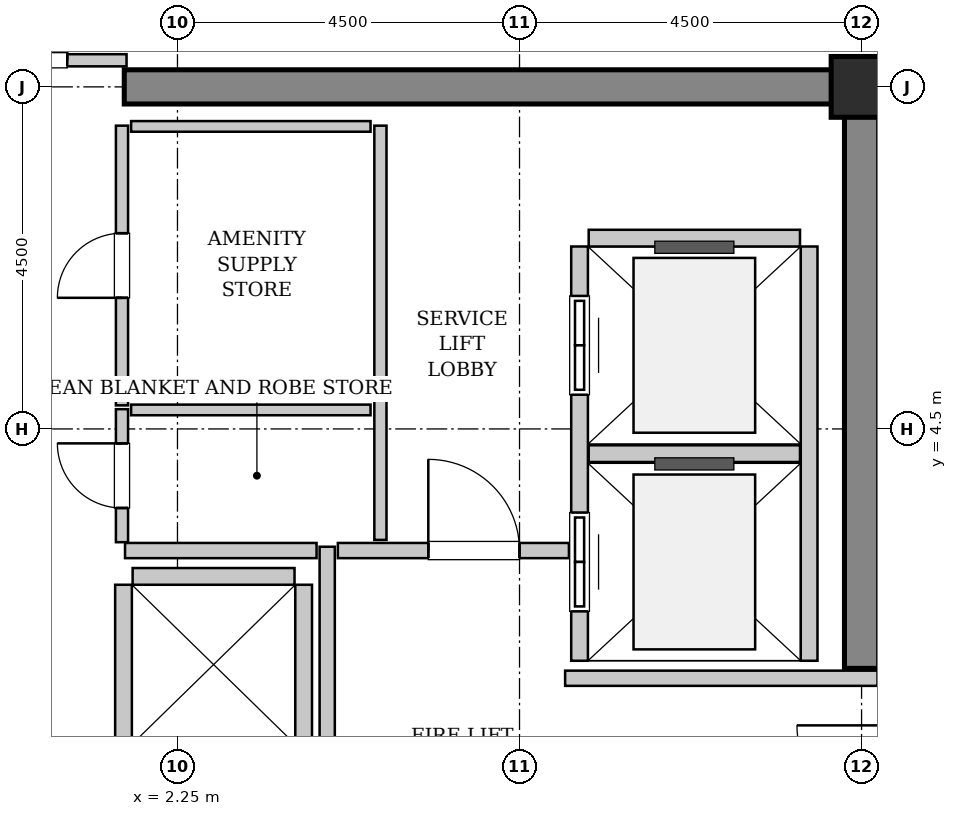
"""IFC4 building model, lengths in metres.
Left out: names, types, materials, properties, quantities, classifications, styles, units other than length and angle.
Written with IfcOpenShell. Run it as: python <this file> out.ifc"""

import sys

from ifc_helpers import new_model, si_unit, direction, frame, frame_2d, origin, origin_2d, place, context, subcontext, project, spatial, rectangle, hollow_rectangle, extrude, source, transform, mapped, element, fill, save


model = new_model("IFC4")
c1 = context("Model", 3, precision=1e-05, world=origin(), true_north=direction((0.0, 1.0)))
c2 = subcontext(c1, "Body", "Model", "MODEL_VIEW")
j1 = project(units=[si_unit("LENGTHUNIT", "METRE"), si_unit("PLANEANGLEUNIT", "RADIAN")], contexts=[c1])
p1 = place(None, origin())
s1 = spatial("IfcSite", under=j1, at=p1, CompositionType="ELEMENT")
p2 = place(p1, origin())
s2 = spatial("IfcBuilding", under=s1, at=p2, CompositionType="ELEMENT")
p3 = place(p2, frame((0.0, 0.0, 295.0)))
s3 = spatial("IfcBuildingStorey", under=s2, at=p3, CompositionType="ELEMENT", Elevation=295.0)
m1 = source(origin(), c2, "Body", "SweptSolid", [
    extrude(rectangle(XDim=9.925, YDim=0.45, at=frame_2d((4.962, 0.0))), origin(), (0.0, 0.0, 1.0), 3.8),
])
p4 = place(p3, frame((1.55, 9.0, 0.0), z_axis=(0.0, 0.0, 1.0), x_axis=(1.0, 0.0, 0.0)))
e1 = element("IfcWall", 1, at=p4, inside=s3, PredefinedType="SHEAR", context=c2, shape_type="MappedRepresentation", body=[
    mapped(m1, transform((0.0, 0.0, 0.0), x_axis=(1.0, 0.0, 0.0), y_axis=(0.0, 1.0, 0.0), z_axis=(0.0, 0.0, 1.0), scale=1.0)),
])
m2 = source(origin(), c2, "Body", "SweptSolid", [
    extrude(rectangle(XDim=7.425, YDim=0.45, at=frame_2d((3.712, 0.0))), origin(), (0.0, 0.0, 1.0), 3.8),
])
p5 = place(p3, frame((11.25, 1.35, 0.0), z_axis=(0.0, 0.0, 1.0), x_axis=(0.0, 1.0, 0.0)))
e2 = element("IfcWall", 2, at=p5, inside=s3, PredefinedType="SHEAR", context=c2, shape_type="MappedRepresentation", body=[
    mapped(m2, transform((0.0, 0.0, 0.0), x_axis=(1.0, 0.0, 0.0), y_axis=(0.0, 1.0, 0.0), z_axis=(0.0, 0.0, 1.0), scale=1.0)),
])
m3 = source(origin(), c2, "Body", "SweptSolid", [
    extrude(hollow_rectangle(XDim=0.8, YDim=0.8, WallThickness=0.04, InnerFilletRadius=0.04, OuterFilletRadius=0.08, at=origin_2d()), origin(), (0.0, 0.0, 1.0), 3.8),
])
p6 = place(p3, frame((11.25, 9.0, 0.0), z_axis=(0.0, 0.0, 1.0), x_axis=(1.0, 0.0, 0.0)))
e3 = element("IfcColumn", 3, at=p6, inside=s3, PredefinedType="COLUMN", context=c2, shape_type="MappedRepresentation", body=[
    mapped(m3, transform((0.0, 0.0, 0.0), x_axis=(1.0, 0.0, 0.0), y_axis=(0.0, 1.0, 0.0), z_axis=(0.0, 0.0, 1.0), scale=1.0)),
])
m4 = source(origin(), c2, "Body", "SweptSolid", [
    extrude(rectangle(XDim=5.45, YDim=0.22, at=frame_2d((2.725, 0.0))), origin(), (0.0, 0.0, 1.0), 3.535),
])
p7 = place(p3, frame((7.54, 6.9, 0.0), z_axis=(0.0, 0.0, 1.0), x_axis=(0.0, -1.0, 0.0)))
e4 = element("IfcWall", 4, at=p7, inside=s3, PredefinedType="SOLIDWALL", context=c2, shape_type="MappedRepresentation", body=[
    mapped(m4, transform((0.0, 0.0, 0.0), x_axis=(1.0, 0.0, 0.0), y_axis=(0.0, 1.0, 0.0), z_axis=(0.0, 0.0, 1.0), scale=1.0)),
])
p8 = place(p7, frame((3.5, 0.0, 0.0)))
e5 = element("IfcOpeningElement", 5, at=p8, cuts=e4, PredefinedType="OPENING", context=c2, shape_type="SweptSolid", body=[
    extrude(rectangle(XDim=1.3, YDim=2.3, at=frame_2d((0.65, 1.15))), frame((0.0, 0.12, 0.0), z_axis=(0.0, -1.0, 0.0), x_axis=(1.0, 0.0, 0.0)), (0.0, 0.0, 1.0), 0.24),
])
p9 = place(p7, frame((0.65, 0.0, 0.0)))
e6 = element("IfcOpeningElement", 6, at=p9, cuts=e4, PredefinedType="OPENING", context=c2, shape_type="SweptSolid", body=[
    extrude(rectangle(XDim=1.3, YDim=2.3, at=frame_2d((0.65, 1.15))), frame((0.0, 0.12, 0.0), z_axis=(0.0, -1.0, 0.0), x_axis=(1.0, 0.0, 0.0)), (0.0, 0.0, 1.0), 0.24),
])
p10 = place(p3, frame((10.56, 1.45, 0.0), z_axis=(0.0, 0.0, 1.0), x_axis=(0.0, 1.0, 0.0)))
e7 = element("IfcWall", 7, at=p10, inside=s3, PredefinedType="SOLIDWALL", context=c2, shape_type="MappedRepresentation", body=[
    mapped(m4, transform((0.0, 0.0, 0.0), x_axis=(1.0, 0.0, 0.0), y_axis=(0.0, 1.0, 0.0), z_axis=(0.0, 0.0, 1.0), scale=1.0)),
])
m5 = source(origin(), c2, "Body", "SweptSolid", [
    extrude(rectangle(XDim=2.78, YDim=0.22, at=frame_2d((1.39, 0.0))), origin(), (0.0, 0.0, 1.0), 3.535),
])
for number, where, z_axis, x_axis in (
    (8, (7.66, 4.175, 0.0), (0.0, 0.0, 1.0), (1.0, 0.0, 0.0)),
    (9, (10.44, 7.01, 0.0), (0.0, 0.0, 1.0), (-1.0, 0.0, 0.0)),
):
    element("IfcWall", number, at=place(p3, frame(where, z_axis=z_axis, x_axis=x_axis)), inside=s3, PredefinedType="SOLIDWALL", context=c2, shape_type="MappedRepresentation", body=[
        mapped(m5, transform((0.0, 0.0, 0.0), x_axis=(1.0, 0.0, 0.0), y_axis=(0.0, 1.0, 0.0), z_axis=(0.0, 0.0, 1.0), scale=1.0)),
    ])
m6 = source(origin(), c2, "Body", "SweptSolid", [
    extrude(rectangle(XDim=4.9, YDim=0.22, at=frame_2d((2.45, 0.0))), origin(), (0.0, 0.0, 1.0), 3.535),
])
for number, where, z_axis, x_axis in (
    (10, (1.54, 2.45, 0.0), (0.0, 0.0, 1.0), (0.0, -1.0, 0.0)),
    (11, (3.91, -2.45, 0.0), (0.0, 0.0, 1.0), (0.0, 1.0, 0.0)),
):
    element("IfcWall", number, at=place(p3, frame(where, z_axis=z_axis, x_axis=x_axis)), inside=s3, PredefinedType="SOLIDWALL", context=c2, shape_type="MappedRepresentation", body=[
        mapped(m6, transform((0.0, 0.0, 0.0), x_axis=(1.0, 0.0, 0.0), y_axis=(0.0, 1.0, 0.0), z_axis=(0.0, 0.0, 1.0), scale=1.0)),
    ])
m7 = source(origin(), c2, "Body", "SweptSolid", [
    extrude(rectangle(XDim=2.13, YDim=0.22, at=frame_2d((1.065, 0.0))), origin(), (0.0, 0.0, 1.0), 3.535),
])
p11 = place(p3, frame((3.79, 2.56, 0.0), z_axis=(0.0, 0.0, 1.0), x_axis=(-1.0, 0.0, 0.0)))
e12 = element("IfcWall", 12, at=p11, inside=s3, PredefinedType="SOLIDWALL", context=c2, shape_type="MappedRepresentation", body=[
    mapped(m7, transform((0.0, 0.0, 0.0), x_axis=(1.0, 0.0, 0.0), y_axis=(0.0, 1.0, 0.0), z_axis=(0.0, 0.0, 1.0), scale=1.0)),
])
m8 = source(origin(), c2, "Body", "SweptSolid", [
    extrude(rectangle(XDim=5.9, YDim=0.2, at=frame_2d((2.95, 0.0))), origin(), (0.0, 0.0, 1.0), 3.535),
])
p12 = place(p3, frame((4.22, -2.95, 0.0), z_axis=(0.0, 0.0, 1.0), x_axis=(0.0, 1.0, 0.0)))
e13 = element("IfcWall", 13, at=p12, inside=s3, PredefinedType="PARTITIONING", context=c2, shape_type="MappedRepresentation", body=[
    mapped(m8, transform((0.0, 0.0, 0.0), x_axis=(1.0, 0.0, 0.0), y_axis=(0.0, 1.0, 0.0), z_axis=(0.0, 0.0, 1.0), scale=1.0)),
])
m9 = source(origin(), c2, "Body", "SweptSolid", [
    extrude(rectangle(XDim=2.52, YDim=0.2, at=frame_2d((1.26, 0.0))), origin(), (0.0, 0.0, 1.0), 3.535),
])
p13 = place(p3, frame((1.56, 2.9, 0.0), z_axis=(0.0, 0.0, 1.0), x_axis=(1.0, 0.0, 0.0)))
e14 = element("IfcWall", 14, at=p13, inside=s3, PredefinedType="PARTITIONING", context=c2, shape_type="MappedRepresentation", body=[
    mapped(m9, transform((0.0, 0.0, 0.0), x_axis=(1.0, 0.0, 0.0), y_axis=(0.0, 1.0, 0.0), z_axis=(0.0, 0.0, 1.0), scale=1.0)),
])
m10 = source(origin(), c2, "Body", "SweptSolid", [
    extrude(rectangle(XDim=3.04, YDim=0.2, at=frame_2d((1.52, 0.0))), origin(), (0.0, 0.0, 1.0), 3.535),
])
p14 = place(p3, frame((4.36, 2.9, 0.0), z_axis=(0.0, 0.0, 1.0), x_axis=(1.0, 0.0, 0.0)))
e15 = element("IfcWall", 15, at=p14, inside=s3, PredefinedType="PARTITIONING", context=c2, shape_type="MappedRepresentation", body=[
    mapped(m10, transform((0.0, 0.0, 0.0), x_axis=(1.0, 0.0, 0.0), y_axis=(0.0, 1.0, 0.0), z_axis=(0.0, 0.0, 1.0), scale=1.0)),
])
p15 = place(p14, frame((1.19, 0.0, 0.0)))
e16 = element("IfcOpeningElement", 16, at=p15, cuts=e15, PredefinedType="OPENING", context=c2, shape_type="SweptSolid", body=[
    extrude(rectangle(XDim=1.2, YDim=2.15, at=frame_2d((0.6, 1.075))), frame((0.0, 0.11, 0.0), z_axis=(0.0, -1.0, 0.0), x_axis=(1.0, 0.0, 0.0)), (0.0, 0.0, 1.0), 0.22),
])
m11 = source(origin(), c2, "Body", "SweptSolid", [
    extrude(rectangle(XDim=4.11, YDim=0.2, at=frame_2d((2.055, 0.0))), origin(), (0.0, 0.0, 1.0), 3.535),
])
p16 = place(p3, frame((7.35, 1.22, 0.0), z_axis=(0.0, 0.0, 1.0), x_axis=(1.0, 0.0, 0.0)))
e17 = element("IfcWall", 17, at=p16, inside=s3, PredefinedType="PARTITIONING", context=c2, shape_type="MappedRepresentation", body=[
    mapped(m11, transform((0.0, 0.0, 0.0), x_axis=(1.0, 0.0, 0.0), y_axis=(0.0, 1.0, 0.0), z_axis=(0.0, 0.0, 1.0), scale=1.0)),
])
m12 = source(origin(), c2, "Body", "SweptSolid", [
    extrude(rectangle(XDim=3.16, YDim=0.16, at=frame_2d((1.58, 0.0))), origin(), (0.0, 0.0, 1.0), 2.625),
])
p17 = place(p3, frame((-1.58, 9.35, 0.0), z_axis=(0.0, 0.0, 1.0), x_axis=(1.0, 0.0, 0.0)))
e18 = element("IfcWall", 18, at=p17, inside=s3, PredefinedType="PARTITIONING", context=c2, shape_type="MappedRepresentation", body=[
    mapped(m12, transform((0.0, 0.0, 0.0), x_axis=(1.0, 0.0, 0.0), y_axis=(0.0, 1.0, 0.0), z_axis=(0.0, 0.0, 1.0), scale=1.0)),
])
p18 = place(p17, frame((0.78, 0.0, 0.0)))
e19 = element("IfcOpeningElement", 19, at=p18, cuts=e18, PredefinedType="OPENING", context=c2, shape_type="SweptSolid", body=[
    extrude(rectangle(XDim=1.6, YDim=2.3, at=frame_2d((0.8, 1.15))), frame((0.0, 0.09, 0.0), z_axis=(0.0, -1.0, 0.0), x_axis=(1.0, 0.0, 0.0)), (0.0, 0.0, 1.0), 0.18),
])
m13 = source(origin(), c2, "Body", "SweptSolid", [
    extrude(rectangle(XDim=5.45, YDim=0.16, at=frame_2d((2.725, 0.0))), origin(), (0.0, 0.0, 1.0), 3.535),
])
p19 = place(p3, frame((4.92, 3.04, 0.0), z_axis=(0.0, 0.0, 1.0), x_axis=(0.0, 1.0, 0.0)))
e20 = element("IfcWall", 20, at=p19, inside=s3, PredefinedType="PARTITIONING", context=c2, shape_type="MappedRepresentation", body=[
    mapped(m13, transform((0.0, 0.0, 0.0), x_axis=(1.0, 0.0, 0.0), y_axis=(0.0, 1.0, 0.0), z_axis=(0.0, 0.0, 1.0), scale=1.0)),
])
m14 = source(origin(), c2, "Body", "SweptSolid", [
    extrude(rectangle(XDim=1.75, YDim=0.16, at=frame_2d((0.875, 0.0))), origin(), (0.0, 0.0, 1.0), 3.535),
])
p20 = place(p3, frame((1.52, 3.01, 0.0), z_axis=(0.0, 0.0, 1.0), x_axis=(0.0, 1.0, 0.0)))
e21 = element("IfcWall", 21, at=p20, inside=s3, PredefinedType="PARTITIONING", context=c2, shape_type="MappedRepresentation", body=[
    mapped(m14, transform((0.0, 0.0, 0.0), x_axis=(1.0, 0.0, 0.0), y_axis=(0.0, 1.0, 0.0), z_axis=(0.0, 0.0, 1.0), scale=1.0)),
])
p21 = place(p20, frame((0.45, 0.0, 0.0)))
e22 = element("IfcOpeningElement", 22, at=p21, cuts=e21, PredefinedType="OPENING", context=c2, shape_type="SweptSolid", body=[
    extrude(rectangle(XDim=0.85, YDim=2.1, at=frame_2d((0.425, 1.05))), frame((0.0, 0.09, 0.0), z_axis=(0.0, -1.0, 0.0), x_axis=(1.0, 0.0, 0.0)), (0.0, 0.0, 1.0), 0.18),
])
m15 = source(origin(), c2, "Body", "SweptSolid", [
    extrude(rectangle(XDim=3.15, YDim=0.14, at=frame_2d((1.575, 0.0))), origin(), (0.0, 0.0, 1.0), 3.535),
])
p22 = place(p3, frame((1.64, 4.75, 0.0), z_axis=(0.0, 0.0, 1.0), x_axis=(1.0, 0.0, 0.0)))
e23 = element("IfcWall", 23, at=p22, inside=s3, PredefinedType="PARTITIONING", context=c2, shape_type="MappedRepresentation", body=[
    mapped(m15, transform((0.0, 0.0, 0.0), x_axis=(1.0, 0.0, 0.0), y_axis=(0.0, 1.0, 0.0), z_axis=(0.0, 0.0, 1.0), scale=1.0)),
])
m16 = source(origin(), c2, "Body", "SweptSolid", [
    extrude(rectangle(XDim=3.68, YDim=0.16, at=frame_2d((1.84, 0.0))), origin(), (0.0, 0.0, 1.0), 3.535),
])
p23 = place(p3, frame((1.52, 4.81, 0.0), z_axis=(0.0, 0.0, 1.0), x_axis=(0.0, 1.0, 0.0)))
e24 = element("IfcWall", 24, at=p23, inside=s3, PredefinedType="PARTITIONING", context=c2, shape_type="MappedRepresentation", body=[
    mapped(m16, transform((0.0, 0.0, 0.0), x_axis=(1.0, 0.0, 0.0), y_axis=(0.0, 1.0, 0.0), z_axis=(0.0, 0.0, 1.0), scale=1.0)),
])
p24 = place(p23, frame((1.415, 0.0, 0.0)))
e25 = element("IfcOpeningElement", 25, at=p24, cuts=e24, PredefinedType="OPENING", context=c2, shape_type="SweptSolid", body=[
    extrude(rectangle(XDim=0.85, YDim=2.1, at=frame_2d((0.425, 1.05))), frame((0.0, 0.09, 0.0), z_axis=(0.0, -1.0, 0.0), x_axis=(1.0, 0.0, 0.0)), (0.0, 0.0, 1.0), 0.18),
])
p25 = place(p3, frame((1.64, 8.48, 0.0), z_axis=(0.0, 0.0, 1.0), x_axis=(1.0, 0.0, 0.0)))
e26 = element("IfcWall", 26, at=p25, inside=s3, PredefinedType="PARTITIONING", context=c2, shape_type="MappedRepresentation", body=[
    mapped(m15, transform((0.0, 0.0, 0.0), x_axis=(1.0, 0.0, 0.0), y_axis=(0.0, 1.0, 0.0), z_axis=(0.0, 0.0, 1.0), scale=1.0)),
])
m17 = source(origin(), c2, "Body", "SweptSolid", [
    extrude(rectangle(XDim=1.3, YDim=2.3, at=frame_2d((0.65, 1.15))), frame((0.0, 0.025, 0.0), z_axis=(0.0, -1.0, 0.0), x_axis=(1.0, 0.0, 0.0)), (0.0, 0.0, 1.0), 0.05),
])
p26 = place(p8, origin())
e27 = element("IfcDoor", 27, at=p26, inside=s3, OperationType="SLIDING_TO_RIGHT", PredefinedType="DOOR", context=c2, shape_type="MappedRepresentation", body=[
    mapped(m17, transform((0.0, 0.0, 0.0), x_axis=(1.0, 0.0, 0.0), y_axis=(0.0, 1.0, 0.0), z_axis=(0.0, 0.0, 1.0), scale=1.0)),
])
fill(e5, e27)
p27 = place(p9, origin())
e28 = element("IfcDoor", 28, at=p27, inside=s3, OperationType="SLIDING_TO_RIGHT", PredefinedType="DOOR", context=c2, shape_type="MappedRepresentation", body=[
    mapped(m17, transform((0.0, 0.0, 0.0), x_axis=(1.0, 0.0, 0.0), y_axis=(0.0, 1.0, 0.0), z_axis=(0.0, 0.0, 1.0), scale=1.0)),
])
fill(e6, e28)
m18 = source(origin(), c2, "Body", "SweptSolid", [
    extrude(rectangle(XDim=1.2, YDim=2.15, at=frame_2d((0.6, 1.075))), frame((0.0, 0.025, 0.0), z_axis=(0.0, -1.0, 0.0), x_axis=(1.0, 0.0, 0.0)), (0.0, 0.0, 1.0), 0.05),
])
p28 = place(p15, origin())
e29 = element("IfcDoor", 29, at=p28, inside=s3, OperationType="SINGLE_SWING_LEFT", PredefinedType="DOOR", context=c2, shape_type="MappedRepresentation", body=[
    mapped(m18, transform((0.0, 0.0, 0.0), x_axis=(1.0, 0.0, 0.0), y_axis=(0.0, 1.0, 0.0), z_axis=(0.0, 0.0, 1.0), scale=1.0)),
])
fill(e16, e29)
m19 = source(origin(), c2, "Body", "SweptSolid", [
    extrude(rectangle(XDim=1.6, YDim=2.3, at=frame_2d((0.8, 1.15))), frame((0.0, 0.025, 0.0), z_axis=(0.0, -1.0, 0.0), x_axis=(1.0, 0.0, 0.0)), (0.0, 0.0, 1.0), 0.05),
])
p29 = place(p18, origin())
e30 = element("IfcDoor", 30, at=p29, inside=s3, OperationType="DOUBLE_DOOR_SINGLE_SWING", PredefinedType="DOOR", context=c2, shape_type="MappedRepresentation", body=[
    mapped(m19, transform((0.0, 0.0, 0.0), x_axis=(1.0, 0.0, 0.0), y_axis=(0.0, 1.0, 0.0), z_axis=(0.0, 0.0, 1.0), scale=1.0)),
])
fill(e19, e30)
m20 = source(origin(), c2, "Body", "SweptSolid", [
    extrude(rectangle(XDim=0.85, YDim=2.1, at=frame_2d((0.425, 1.05))), frame((0.0, 0.025, 0.0), z_axis=(0.0, -1.0, 0.0), x_axis=(1.0, 0.0, 0.0)), (0.0, 0.0, 1.0), 0.05),
])
p30 = place(p21, origin())
e31 = element("IfcDoor", 31, at=p30, inside=s3, OperationType="SINGLE_SWING_RIGHT", PredefinedType="DOOR", context=c2, shape_type="MappedRepresentation", body=[
    mapped(m20, transform((0.0, 0.0, 0.0), x_axis=(1.0, 0.0, 0.0), y_axis=(0.0, 1.0, 0.0), z_axis=(0.0, 0.0, 1.0), scale=1.0)),
])
fill(e22, e31)
p31 = place(p24, origin())
e32 = element("IfcDoor", 32, at=p31, inside=s3, OperationType="SINGLE_SWING_LEFT", PredefinedType="DOOR", context=c2, shape_type="MappedRepresentation", body=[
    mapped(m20, transform((0.0, 0.0, 0.0), x_axis=(1.0, 0.0, 0.0), y_axis=(0.0, 1.0, 0.0), z_axis=(0.0, 0.0, 1.0), scale=1.0)),
])
fill(e25, e32)
save(model, sys.argv[1])
